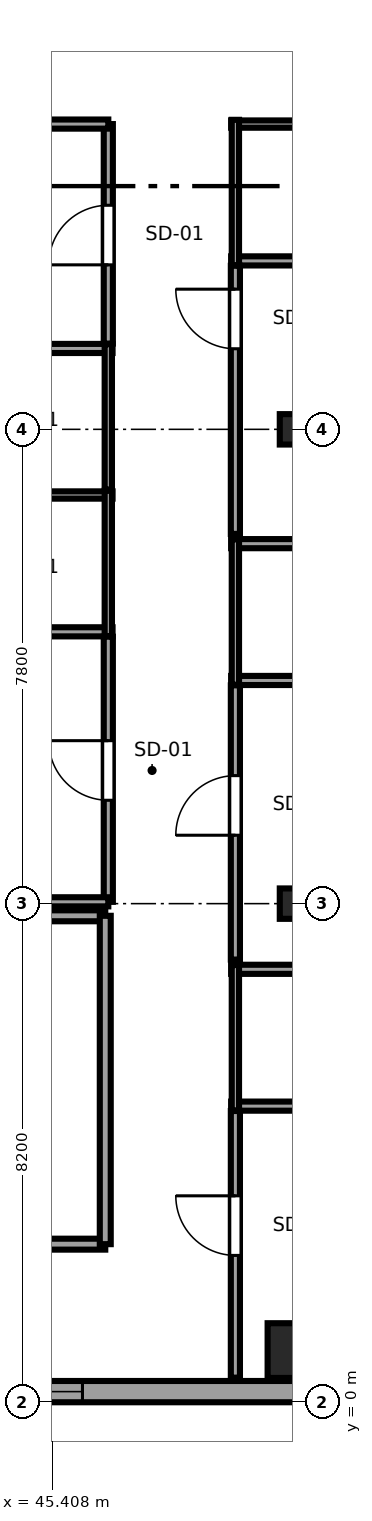
"""IFC4 building model, lengths in metres.
Left out: names, types, materials, properties, quantities, classifications, styles, units other than length and angle.
Written with IfcOpenShell. Run it as: python <this file> out.ifc"""

import sys

from ifc_helpers import new_model, si_unit, direction, frame, frame_2d, origin, origin_2d, place, context, subcontext, project, spatial, rectangle, i_section, extrude, source, transform, mapped, element, fill, save


model = new_model("IFC4")
c1 = context("Model", 3, precision=1e-05, world=origin(), true_north=direction((0.0, 1.0)))
c2 = subcontext(c1, "Body", "Model", "MODEL_VIEW")
j1 = project(units=[si_unit("LENGTHUNIT", "METRE"), si_unit("PLANEANGLEUNIT", "RADIAN")], contexts=[c1])
p1 = place(None, origin())
s1 = spatial("IfcSite", under=j1, at=p1, CompositionType="ELEMENT")
p2 = place(p1, origin())
s2 = spatial("IfcBuilding", under=s1, at=p2, CompositionType="ELEMENT")
p3 = place(p2, frame((0.0, 0.0, 78.15)))
s3 = spatial("IfcBuildingStorey", under=s2, at=p3, CompositionType="ELEMENT", Elevation=78.15)
m1 = source(origin(), c2, "Body", "SweptSolid", [
    extrude(rectangle(XDim=0.9, YDim=0.9, at=origin_2d()), origin(), (0.0, 0.0, 1.0), 3.55),
])
p4 = place(p3, frame((49.4, 0.85, 0.0), z_axis=(0.0, 0.0, 1.0), x_axis=(1.0, 0.0, 0.0)))
e1 = element("IfcColumn", 1, at=p4, inside=s3, PredefinedType="COLUMN", context=c2, shape_type="MappedRepresentation", body=[
    mapped(m1, transform((0.0, 0.0, 0.0), x_axis=(1.0, 0.0, 0.0), y_axis=(0.0, 1.0, 0.0), z_axis=(0.0, 0.0, 1.0), scale=1.0)),
])
m2 = source(origin(), c2, "Body", "SweptSolid", [
    extrude(i_section(OverallWidth=0.5, OverallDepth=0.5, WebThickness=0.022, FlangeThickness=0.034, at=origin_2d()), origin(), (0.0, 0.0, 1.0), 3.55),
])
for number, where, z_axis, x_axis in (
    (2, (49.4, 8.2, 0.0), (0.0, 0.0, 1.0), (1.0, 0.0, 0.0)),
    (3, (49.4, 16.0, 0.0), (0.0, 0.0, 1.0), (1.0, 0.0, 0.0)),
):
    element("IfcColumn", number, at=place(p3, frame(where, z_axis=z_axis, x_axis=x_axis)), inside=s3, PredefinedType="COLUMN", context=c2, shape_type="MappedRepresentation", body=[
        mapped(m2, transform((0.0, 0.0, 0.0), x_axis=(1.0, 0.0, 0.0), y_axis=(0.0, 1.0, 0.0), z_axis=(0.0, 0.0, 1.0), scale=1.0)),
    ])
p5 = place(p3, frame((34.375, 0.175, 0.0), z_axis=(0.0, 0.0, 1.0), x_axis=(1.0, 0.0, 0.0)))
e4 = element("IfcWall", 4, at=p5, inside=s3, PredefinedType="SOLIDWALL", context=c2, shape_type="SweptSolid", body=[
    extrude(rectangle(XDim=18.008, YDim=0.35, at=frame_2d((9.004, 0.0))), origin(), (0.0, 0.0, 1.0), 3.37),
])
p6 = place(p5, frame((1.726, 0.0, 0.68)))
e5 = element("IfcOpeningElement", 5, at=p6, cuts=e4, PredefinedType="OPENING", context=c2, shape_type="SweptSolid", body=[
    extrude(rectangle(XDim=1.95, YDim=1.82, at=frame_2d((0.975, 0.91))), frame((0.0, 0.185, 0.0), z_axis=(0.0, -1.0, 0.0), x_axis=(1.0, 0.0, 0.0)), (0.0, 0.0, 1.0), 0.37),
])
p7 = place(p5, frame((9.58, 0.0, 0.68)))
e6 = element("IfcOpeningElement", 6, at=p7, cuts=e4, PredefinedType="OPENING", context=c2, shape_type="SweptSolid", body=[
    extrude(rectangle(XDim=1.95, YDim=1.82, at=frame_2d((0.975, 0.91))), frame((0.0, 0.185, 0.0), z_axis=(0.0, -1.0, 0.0), x_axis=(1.0, 0.0, 0.0)), (0.0, 0.0, 1.0), 0.37),
])
p8 = place(p3, frame((43.81, 12.67, 0.0), z_axis=(0.0, 0.0, 1.0), x_axis=(1.0, 0.0, 0.0)))
e7 = element("IfcWall", 7, at=p8, inside=s3, PredefinedType="PARTITIONING", context=c2, shape_type="SweptSolid", body=[
    extrude(rectangle(XDim=2.59, YDim=0.15, at=frame_2d((1.295, 0.0))), origin(), (0.0, 0.0, 1.0), 3.37),
])
p9 = place(p3, frame((43.81, 14.92, 0.0), z_axis=(0.0, 0.0, 1.0), x_axis=(1.0, 0.0, 0.0)))
e8 = element("IfcWall", 8, at=p9, inside=s3, PredefinedType="PLUMBINGWALL", context=c2, shape_type="SweptSolid", body=[
    extrude(rectangle(XDim=2.59, YDim=0.12, at=frame_2d((1.295, 0.0))), origin(), (0.0, 0.0, 1.0), 3.37),
])
p10 = place(p3, frame((46.33, 12.6, 0.0), z_axis=(0.0, 0.0, 1.0), x_axis=(0.0, 1.0, 0.0)))
e9 = element("IfcWall", 9, at=p10, inside=s3, PredefinedType="PLUMBINGWALL", context=c2, shape_type="SweptSolid", body=[
    extrude(rectangle(XDim=2.39, YDim=0.12, at=frame_2d((1.195, 0.0))), origin(), (0.0, 0.0, 1.0), 3.37),
])
p11 = place(p3, frame((43.81, 17.33, 0.0), z_axis=(0.0, 0.0, 1.0), x_axis=(1.0, 0.0, 0.0)))
e10 = element("IfcWall", 10, at=p11, inside=s3, PredefinedType="PARTITIONING", context=c2, shape_type="SweptSolid", body=[
    extrude(rectangle(XDim=2.59, YDim=0.15, at=frame_2d((1.295, 0.0))), origin(), (0.0, 0.0, 1.0), 3.37),
])
p12 = place(p3, frame((46.33, 15.01, 0.0), z_axis=(0.0, 0.0, 1.0), x_axis=(0.0, 1.0, 0.0)))
e11 = element("IfcWall", 11, at=p12, inside=s3, PredefinedType="PLUMBINGWALL", context=c2, shape_type="SweptSolid", body=[
    extrude(rectangle(XDim=2.39, YDim=0.12, at=frame_2d((1.195, 0.0))), origin(), (0.0, 0.0, 1.0), 3.37),
])
for number, where, z_axis, x_axis in (
    (12, (48.35, 4.87, 0.0), (0.0, 0.0, 1.0), (1.0, 0.0, 0.0)),
    (13, (48.35, 7.12, 0.0), (0.0, 0.0, 1.0), (1.0, 0.0, 0.0)),
):
    element("IfcWall", number, at=place(p3, frame(where, z_axis=z_axis, x_axis=x_axis)), inside=s3, PredefinedType="PARTITIONING", context=c2, shape_type="SweptSolid", body=[
        extrude(rectangle(XDim=2.59, YDim=0.15, at=frame_2d((1.295, 0.0))), origin(), (0.0, 0.0, 1.0), 3.37),
    ])
p13 = place(p3, frame((48.42, 4.8, 0.0), z_axis=(0.0, 0.0, 1.0), x_axis=(0.0, 1.0, 0.0)))
e14 = element("IfcWall", 14, at=p13, inside=s3, PredefinedType="PLUMBINGWALL", context=c2, shape_type="SweptSolid", body=[
    extrude(rectangle(XDim=2.39, YDim=0.12, at=frame_2d((1.195, 0.0))), origin(), (0.0, 0.0, 1.0), 3.37),
])
for number, where, z_axis, x_axis in (
    (15, (48.35, 11.87, 0.0), (0.0, 0.0, 1.0), (1.0, 0.0, 0.0)),
    (16, (48.35, 14.12, 0.0), (0.0, 0.0, 1.0), (1.0, 0.0, 0.0)),
):
    element("IfcWall", number, at=place(p3, frame(where, z_axis=z_axis, x_axis=x_axis)), inside=s3, PredefinedType="PARTITIONING", context=c2, shape_type="SweptSolid", body=[
        extrude(rectangle(XDim=2.59, YDim=0.15, at=frame_2d((1.295, 0.0))), origin(), (0.0, 0.0, 1.0), 3.37),
    ])
p14 = place(p3, frame((48.42, 11.8, 0.0), z_axis=(0.0, 0.0, 1.0), x_axis=(0.0, 1.0, 0.0)))
e17 = element("IfcWall", 17, at=p14, inside=s3, PredefinedType="PLUMBINGWALL", context=c2, shape_type="SweptSolid", body=[
    extrude(rectangle(XDim=2.39, YDim=0.12, at=frame_2d((1.195, 0.0))), origin(), (0.0, 0.0, 1.0), 3.37),
])
p15 = place(p3, frame((48.35, 18.77, 0.0), z_axis=(0.0, 0.0, 1.0), x_axis=(1.0, 0.0, 0.0)))
e18 = element("IfcWall", 18, at=p15, inside=s3, PredefinedType="PARTITIONING", context=c2, shape_type="SweptSolid", body=[
    extrude(rectangle(XDim=2.59, YDim=0.15, at=frame_2d((1.295, 0.0))), origin(), (0.0, 0.0, 1.0), 3.37),
])
p16 = place(p3, frame((48.35, 21.02, 0.0), z_axis=(0.0, 0.0, 1.0), x_axis=(1.0, 0.0, 0.0)))
e19 = element("IfcWall", 19, at=p16, inside=s3, PredefinedType="PLUMBINGWALL", context=c2, shape_type="SweptSolid", body=[
    extrude(rectangle(XDim=2.59, YDim=0.12, at=frame_2d((1.295, 0.0))), origin(), (0.0, 0.0, 1.0), 3.37),
])
p17 = place(p3, frame((48.42, 18.7, 0.0), z_axis=(0.0, 0.0, 1.0), x_axis=(0.0, 1.0, 0.0)))
e20 = element("IfcWall", 20, at=p17, inside=s3, PredefinedType="PLUMBINGWALL", context=c2, shape_type="SweptSolid", body=[
    extrude(rectangle(XDim=2.39, YDim=0.12, at=frame_2d((1.195, 0.0))), origin(), (0.0, 0.0, 1.0), 3.37),
])
p18 = place(p3, frame((46.33, 8.23, 0.0), z_axis=(0.0, 0.0, 1.0), x_axis=(0.0, 1.0, 0.0)))
e21 = element("IfcWall", 21, at=p18, inside=s3, PredefinedType="PARTITIONING", context=c2, shape_type="SweptSolid", body=[
    extrude(rectangle(XDim=4.36, YDim=0.15, at=frame_2d((2.18, 0.0))), origin(), (0.0, 0.0, 1.0), 3.37),
])
p19 = place(p18, frame((1.67, 0.0, 0.0)))
e22 = element("IfcOpeningElement", 22, at=p19, cuts=e21, PredefinedType="OPENING", context=c2, shape_type="SweptSolid", body=[
    extrude(rectangle(XDim=0.98, YDim=2.12, at=frame_2d((0.49, 1.06))), frame((0.0, 0.085, 0.0), z_axis=(0.0, -1.0, 0.0), x_axis=(1.0, 0.0, 0.0)), (0.0, 0.0, 1.0), 0.17),
])
p20 = place(p3, frame((34.65, 8.23, 0.0), z_axis=(0.0, 0.0, 1.0), x_axis=(1.0, 0.0, 0.0)))
e23 = element("IfcWall", 23, at=p20, inside=s3, PredefinedType="PARTITIONING", context=c2, shape_type="SweptSolid", body=[
    extrude(rectangle(XDim=11.68, YDim=0.15, at=frame_2d((5.84, 0.0))), origin(), (0.0, 0.0, 1.0), 2.748),
])
p21 = place(p3, frame((46.33, 17.41, 0.0), z_axis=(0.0, 0.0, 1.0), x_axis=(0.0, 1.0, 0.0)))
e24 = element("IfcWall", 24, at=p21, inside=s3, PredefinedType="PARTITIONING", context=c2, shape_type="SweptSolid", body=[
    extrude(rectangle(XDim=3.61, YDim=0.15, at=frame_2d((1.805, 0.0))), origin(), (0.0, 0.0, 1.0), 3.37),
])
p22 = place(p21, frame((1.295, 0.0, 0.0)))
e25 = element("IfcOpeningElement", 25, at=p22, cuts=e24, PredefinedType="OPENING", context=c2, shape_type="SweptSolid", body=[
    extrude(rectangle(XDim=0.98, YDim=2.12, at=frame_2d((0.49, 1.06))), frame((0.0, 0.085, 0.0), z_axis=(0.0, -1.0, 0.0), x_axis=(1.0, 0.0, 0.0)), (0.0, 0.0, 1.0), 0.17),
])
p23 = place(p3, frame((34.65, 21.02, 0.0), z_axis=(0.0, 0.0, 1.0), x_axis=(1.0, 0.0, 0.0)))
e26 = element("IfcWall", 26, at=p23, inside=s3, PredefinedType="PARTITIONING", context=c2, shape_type="SweptSolid", body=[
    extrude(rectangle(XDim=11.68, YDim=0.15, at=frame_2d((5.84, 0.0))), origin(), (0.0, 0.0, 1.0), 3.37),
])
p24 = place(p3, frame((48.42, 0.405, 0.0), z_axis=(0.0, 0.0, 1.0), x_axis=(0.0, 1.0, 0.0)))
e27 = element("IfcWall", 27, at=p24, inside=s3, PredefinedType="PARTITIONING", context=c2, shape_type="SweptSolid", body=[
    extrude(rectangle(XDim=4.385, YDim=0.15, at=frame_2d((2.192, 0.0))), origin(), (0.0, 0.0, 1.0), 3.37),
])
p25 = place(p24, frame((2.01, 0.0, 0.0)))
e28 = element("IfcOpeningElement", 28, at=p25, cuts=e27, PredefinedType="OPENING", context=c2, shape_type="SweptSolid", body=[
    extrude(rectangle(XDim=0.98, YDim=2.12, at=frame_2d((0.49, 1.06))), frame((0.0, 0.085, 0.0), z_axis=(0.0, -1.0, 0.0), x_axis=(1.0, 0.0, 0.0)), (0.0, 0.0, 1.0), 0.17),
])
p26 = place(p3, frame((48.42, 7.28, 0.0), z_axis=(0.0, 0.0, 1.0), x_axis=(0.0, 1.0, 0.0)))
e29 = element("IfcWall", 29, at=p26, inside=s3, PredefinedType="PARTITIONING", context=c2, shape_type="SweptSolid", body=[
    extrude(rectangle(XDim=4.51, YDim=0.15, at=frame_2d((2.255, 0.0))), origin(), (0.0, 0.0, 1.0), 3.37),
])
p27 = place(p26, frame((2.045, 0.0, 0.0)))
e30 = element("IfcOpeningElement", 30, at=p27, cuts=e29, PredefinedType="OPENING", context=c2, shape_type="SweptSolid", body=[
    extrude(rectangle(XDim=0.98, YDim=2.12, at=frame_2d((0.49, 1.06))), frame((0.0, 0.085, 0.0), z_axis=(0.0, -1.0, 0.0), x_axis=(1.0, 0.0, 0.0)), (0.0, 0.0, 1.0), 0.17),
])
p28 = place(p3, frame((48.42, 14.28, 0.0), z_axis=(0.0, 0.0, 1.0), x_axis=(0.0, 1.0, 0.0)))
e31 = element("IfcWall", 31, at=p28, inside=s3, PredefinedType="PARTITIONING", context=c2, shape_type="SweptSolid", body=[
    extrude(rectangle(XDim=4.41, YDim=0.15, at=frame_2d((2.205, 0.0))), origin(), (0.0, 0.0, 1.0), 3.37),
])
p29 = place(p28, frame((3.045, 0.0, 0.0)))
e32 = element("IfcOpeningElement", 32, at=p29, cuts=e31, PredefinedType="OPENING", context=c2, shape_type="SweptSolid", body=[
    extrude(rectangle(XDim=0.98, YDim=2.12, at=frame_2d((0.49, 1.06))), frame((0.0, 0.085, 0.0), z_axis=(0.0, -1.0, 0.0), x_axis=(1.0, 0.0, 0.0)), (0.0, 0.0, 1.0), 0.17),
])
for number, where, z_axis, x_axis in (
    (33, (12.27, 2.6, 0.0), (0.0, 0.0, 1.0), (1.0, 0.0, 0.0)),
    (34, (12.27, 8.0, 0.0), (0.0, 0.0, 1.0), (1.0, 0.0, 0.0)),
):
    element("IfcWall", number, at=place(p3, frame(where, z_axis=z_axis, x_axis=x_axis)), inside=s3, PredefinedType="PARTITIONING", context=c2, shape_type="SweptSolid", body=[
        extrude(rectangle(XDim=34.01, YDim=0.18, at=frame_2d((17.005, 0.0))), origin(), (0.0, 0.0, 1.0), 3.37),
    ])
p30 = place(p3, frame((46.28, 2.6, 0.0), z_axis=(0.0, 0.0, 1.0), x_axis=(0.0, 1.0, 0.0)))
e35 = element("IfcWall", 35, at=p30, inside=s3, PredefinedType="PARTITIONING", context=c2, shape_type="SweptSolid", body=[
    extrude(rectangle(XDim=5.4, YDim=0.18, at=frame_2d((2.7, 0.0))), origin(), (0.0, 0.0, 1.0), 3.37),
])
m3 = source(origin(), c2, "Body", "SweptSolid", [
    extrude(rectangle(XDim=1.95, YDim=1.82, at=frame_2d((0.975, 0.91))), frame((0.0, 0.09, 0.0), z_axis=(0.0, -1.0, 0.0), x_axis=(1.0, 0.0, 0.0)), (0.0, 0.0, 1.0), 0.06),
])
p31 = place(p7, origin())
e36 = element("IfcWindow", 36, at=p31, inside=s3, PartitioningType="DOUBLE_PANEL_VERTICAL", PredefinedType="WINDOW", context=c2, shape_type="MappedRepresentation", body=[
    mapped(m3, transform((0.0, 0.0, 0.0), x_axis=(1.0, 0.0, 0.0), y_axis=(0.0, 1.0, 0.0), z_axis=(0.0, 0.0, 1.0), scale=1.0)),
])
fill(e6, e36)
m4 = source(origin(), c2, "Body", "SweptSolid", [
    extrude(rectangle(XDim=0.98, YDim=2.12, at=frame_2d((0.49, 1.06))), frame((0.0, 0.025, 0.0), z_axis=(0.0, -1.0, 0.0), x_axis=(1.0, 0.0, 0.0)), (0.0, 0.0, 1.0), 0.05),
])
p32 = place(p19, origin())
e37 = element("IfcDoor", 37, at=p32, inside=s3, OperationType="SINGLE_SWING_RIGHT", PredefinedType="DOOR", context=c2, shape_type="MappedRepresentation", body=[
    mapped(m4, transform((0.0, 0.0, 0.0), x_axis=(1.0, 0.0, 0.0), y_axis=(0.0, 1.0, 0.0), z_axis=(0.0, 0.0, 1.0), scale=1.0)),
])
fill(e22, e37)
p33 = place(p22, origin())
e38 = element("IfcDoor", 38, at=p33, inside=s3, OperationType="SINGLE_SWING_LEFT", PredefinedType="DOOR", context=c2, shape_type="MappedRepresentation", body=[
    mapped(m4, transform((0.0, 0.0, 0.0), x_axis=(1.0, 0.0, 0.0), y_axis=(0.0, 1.0, 0.0), z_axis=(0.0, 0.0, 1.0), scale=1.0)),
])
fill(e25, e38)
p34 = place(p25, origin())
e39 = element("IfcDoor", 39, at=p34, inside=s3, OperationType="SINGLE_SWING_RIGHT", PredefinedType="DOOR", context=c2, shape_type="MappedRepresentation", body=[
    mapped(m4, transform((0.0, 0.0, 0.0), x_axis=(1.0, 0.0, 0.0), y_axis=(0.0, 1.0, 0.0), z_axis=(0.0, 0.0, 1.0), scale=1.0)),
])
fill(e28, e39)
p35 = place(p27, origin())
e40 = element("IfcDoor", 40, at=p35, inside=s3, OperationType="SINGLE_SWING_LEFT", PredefinedType="DOOR", context=c2, shape_type="MappedRepresentation", body=[
    mapped(m4, transform((0.0, 0.0, 0.0), x_axis=(1.0, 0.0, 0.0), y_axis=(0.0, 1.0, 0.0), z_axis=(0.0, 0.0, 1.0), scale=1.0)),
])
fill(e30, e40)
p36 = place(p29, origin())
e41 = element("IfcDoor", 41, at=p36, inside=s3, OperationType="SINGLE_SWING_RIGHT", PredefinedType="DOOR", context=c2, shape_type="MappedRepresentation", body=[
    mapped(m4, transform((0.0, 0.0, 0.0), x_axis=(1.0, 0.0, 0.0), y_axis=(0.0, 1.0, 0.0), z_axis=(0.0, 0.0, 1.0), scale=1.0)),
])
fill(e32, e41)
save(model, sys.argv[1])
